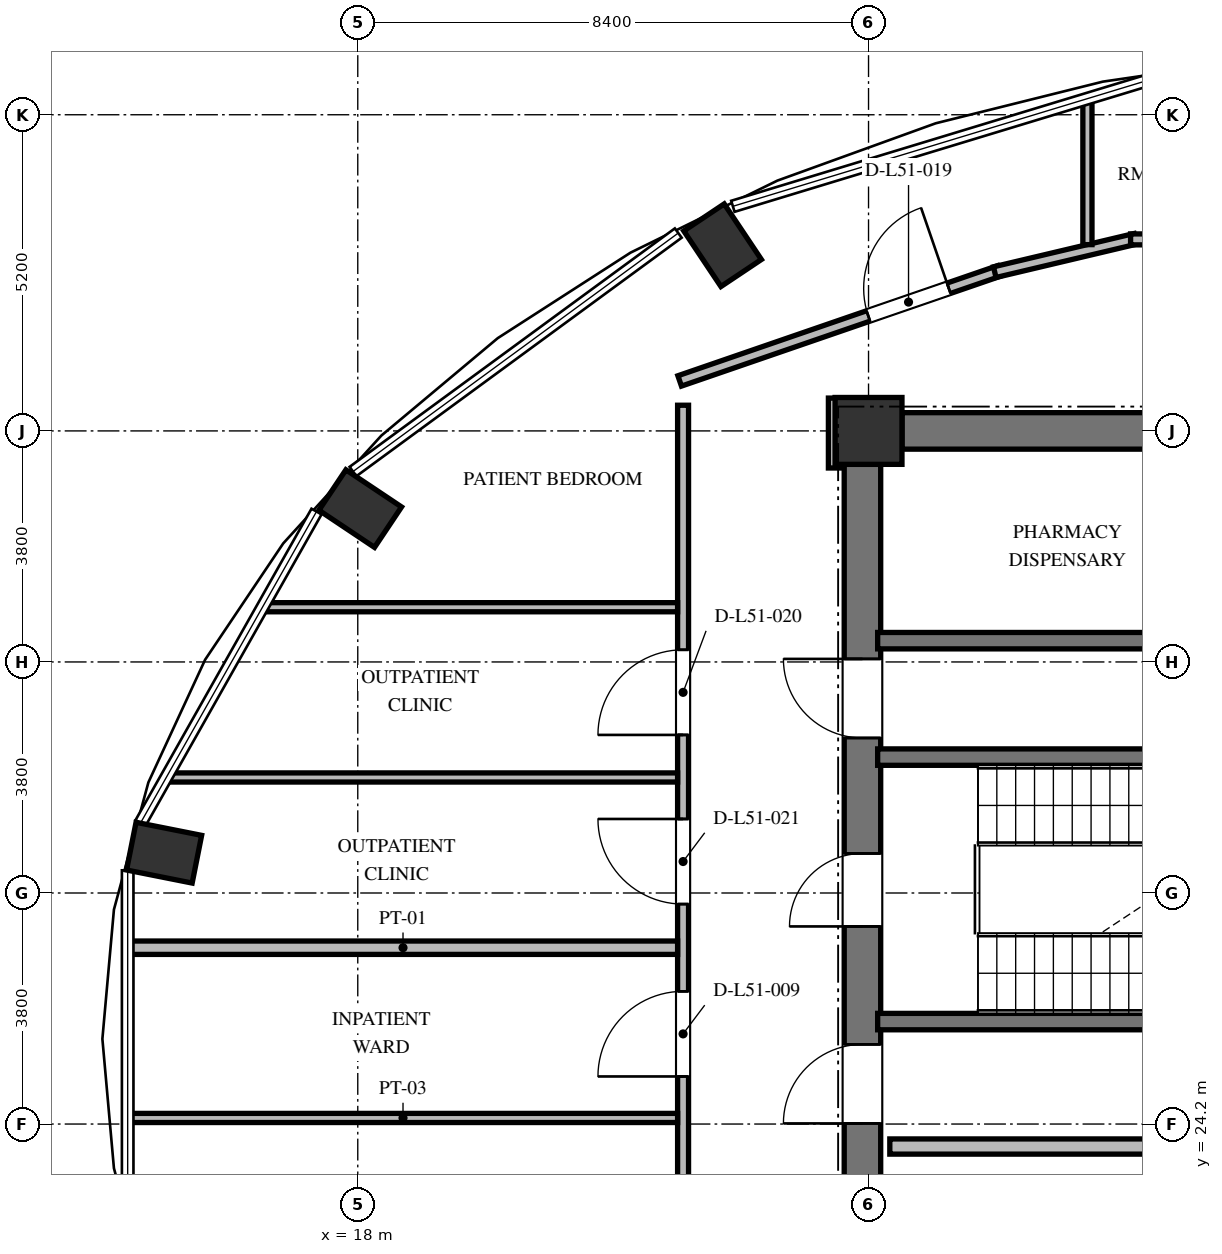
"""IFC4 building model, lengths in metres.
Left out: names, types, materials, properties, quantities, classifications, styles, units other than length and angle.
Written with IfcOpenShell. Run it as: python <this file> out.ifc"""

import sys

from ifc_helpers import new_model, si_unit, direction, frame, frame_2d, origin, origin_2d, place, context, subcontext, project, spatial, rectangle, extrude, element, fill, save


model = new_model("IFC4")
c1 = context("Model", 3, precision=1e-05, world=origin(), true_north=direction((0.0, 1.0)))
c2 = subcontext(c1, "Body", "Model", "MODEL_VIEW")
j1 = project(units=[si_unit("LENGTHUNIT", "METRE"), si_unit("PLANEANGLEUNIT", "RADIAN")], contexts=[c1])
p1 = place(None, origin())
s1 = spatial("IfcSite", under=j1, at=p1, CompositionType="ELEMENT")
p2 = place(p1, origin())
s2 = spatial("IfcBuilding", under=s1, at=p2, CompositionType="ELEMENT")
p3 = place(p2, frame((0.0, 0.0, 198.48)))
s3 = spatial("IfcBuildingStorey", under=s2, at=p3, CompositionType="ELEMENT", Elevation=198.48)
for number, where, z_axis, x_axis in (
    (1, (24.0, 38.654, 0.0), (0.0, 0.0, 1.0), (-0.556, 0.831, 0.0)),
    (2, (18.04, 34.323, 0.0), (0.0, 0.0, 1.0), (-0.831, 0.556, 0.0)),
    (3, (14.815, 28.663, 0.0), (0.0, 0.0, 1.0), (-0.981, 0.195, 0.0)),
):
    element("IfcColumn", number, at=place(p3, frame(where, z_axis=z_axis, x_axis=x_axis)), inside=s3, PredefinedType="COLUMN", context=c2, shape_type="SweptSolid", body=[
        extrude(rectangle(XDim=1.1, YDim=0.8, at=origin_2d()), origin(), (0.0, 0.0, 1.0), 3.648),
    ])
p4 = place(p3, frame((26.4, 35.6, 0.0), z_axis=(0.0, 0.0, 1.0), x_axis=(1.0, 0.0, 0.0)))
e4 = element("IfcColumn", 4, at=p4, inside=s3, PredefinedType="COLUMN", context=c2, shape_type="SweptSolid", body=[
    extrude(rectangle(XDim=1.1, YDim=1.1, at=origin_2d()), origin(), (0.0, 0.0, 1.0), 3.648),
])
p5 = place(p3, frame((26.3, 20.95, 0.0), z_axis=(0.0, 0.0, 1.0), x_axis=(0.0, 1.0, 0.0)))
e5 = element("IfcWall", 5, at=p5, inside=s3, PredefinedType="SHEAR", context=c2, shape_type="SweptSolid", body=[
    extrude(rectangle(XDim=14.1, YDim=0.6, at=frame_2d((7.05, 0.0))), origin(), (0.0, 0.0, 1.0), 3.648),
])
p6 = place(p5, frame((6.5, 0.0, 0.0)))
e6 = element("IfcOpeningElement", 6, at=p6, cuts=e5, PredefinedType="OPENING", context=c2, shape_type="SweptSolid", body=[
    extrude(rectangle(XDim=1.2, YDim=2.15, at=frame_2d((0.6, 1.075))), frame((0.0, 0.31, 0.0), z_axis=(0.0, -1.0, 0.0), x_axis=(1.0, 0.0, 0.0)), (0.0, 0.0, 1.0), 0.62),
])
p7 = place(p5, frame((9.6, 0.0, 0.0)))
e7 = element("IfcOpeningElement", 7, at=p7, cuts=e5, PredefinedType="OPENING", context=c2, shape_type="SweptSolid", body=[
    extrude(rectangle(XDim=1.3, YDim=2.2, at=frame_2d((0.65, 1.1))), frame((0.0, 0.31, 0.0), z_axis=(0.0, -1.0, 0.0), x_axis=(1.0, 0.0, 0.0)), (0.0, 0.0, 1.0), 0.62),
])
p8 = place(p5, frame((3.26, 0.0, 0.0)))
e8 = element("IfcOpeningElement", 8, at=p8, cuts=e5, PredefinedType="OPENING", context=c2, shape_type="SweptSolid", body=[
    extrude(rectangle(XDim=1.3, YDim=2.2, at=frame_2d((0.65, 1.1))), frame((0.0, 0.31, 0.0), z_axis=(0.0, -1.0, 0.0), x_axis=(1.0, 0.0, 0.0)), (0.0, 0.0, 1.0), 0.62),
])
p9 = place(p3, frame((26.95, 35.6, 0.0), z_axis=(0.0, 0.0, 1.0), x_axis=(1.0, 0.0, 0.0)))
e9 = element("IfcWall", 9, at=p9, inside=s3, PredefinedType="SHEAR", context=c2, shape_type="SweptSolid", body=[
    extrude(rectangle(XDim=5.45, YDim=0.6, at=frame_2d((2.725, 0.0))), origin(), (0.0, 0.0, 1.0), 3.648),
])
for number, where, z_axis, x_axis in (
    (10, (26.55, 30.235, 0.0), (0.0, 0.0, 1.0), (1.0, 0.0, 0.0)),
    (11, (26.55, 25.885, 0.0), (0.0, 0.0, 1.0), (1.0, 0.0, 0.0)),
):
    element("IfcWall", number, at=place(p3, frame(where, z_axis=z_axis, x_axis=x_axis)), inside=s3, PredefinedType="SHEAR", context=c2, shape_type="SweptSolid", body=[
        extrude(rectangle(XDim=7.985, YDim=0.27, at=frame_2d((3.992, 0.0))), origin(), (0.0, 0.0, 1.0), 3.648),
    ])
p10 = place(p3, frame((26.55, 32.15, 0.0), z_axis=(0.0, 0.0, 1.0), x_axis=(1.0, 0.0, 0.0)))
e12 = element("IfcWall", 12, at=p10, inside=s3, PredefinedType="SHEAR", context=c2, shape_type="SweptSolid", body=[
    extrude(rectangle(XDim=16.4, YDim=0.27, at=frame_2d((8.2, 0.0))), origin(), (0.0, 0.0, 1.0), 3.648),
])
p11 = place(p10, frame((5.125, 0.0, 0.0)))
e13 = element("IfcOpeningElement", 13, at=p11, cuts=e12, PredefinedType="OPENING", context=c2, shape_type="SweptSolid", body=[
    extrude(rectangle(XDim=1.05, YDim=2.15, at=frame_2d((0.525, 1.075))), frame((0.0, 0.145, 0.0), z_axis=(0.0, -1.0, 0.0), x_axis=(1.0, 0.0, 0.0)), (0.0, 0.0, 1.0), 0.29),
])
p12 = place(p10, frame((11.9, 0.0, 0.0)))
e14 = element("IfcOpeningElement", 14, at=p12, cuts=e12, PredefinedType="OPENING", context=c2, shape_type="SweptSolid", body=[
    extrude(rectangle(XDim=1.1, YDim=2.2, at=frame_2d((0.55, 1.1))), frame((0.0, 0.145, 0.0), z_axis=(0.0, -1.0, 0.0), x_axis=(1.0, 0.0, 0.0)), (0.0, 0.0, 1.0), 0.29),
])
p13 = place(p10, frame((14.5, 0.0, 0.0)))
e15 = element("IfcOpeningElement", 15, at=p13, cuts=e12, PredefinedType="OPENING", context=c2, shape_type="SweptSolid", body=[
    extrude(rectangle(XDim=1.1, YDim=2.2, at=frame_2d((0.55, 1.1))), frame((0.0, 0.145, 0.0), z_axis=(0.0, -1.0, 0.0), x_axis=(1.0, 0.0, 0.0)), (0.0, 0.0, 1.0), 0.29),
])
p14 = place(p3, frame((26.75, 23.83, 0.0), z_axis=(0.0, 0.0, 1.0), x_axis=(1.0, 0.0, 0.0)))
e16 = element("IfcWall", 16, at=p14, inside=s3, PredefinedType="SOLIDWALL", context=c2, shape_type="SweptSolid", body=[
    extrude(rectangle(XDim=16.2, YDim=0.25, at=frame_2d((8.1, 0.0))), origin(), (0.0, 0.0, 1.0), 3.448),
])
p15 = place(p14, frame((4.75, 0.0, 0.0)))
e17 = element("IfcOpeningElement", 17, at=p15, cuts=e16, PredefinedType="OPENING", context=c2, shape_type="SweptSolid", body=[
    extrude(rectangle(XDim=1.4, YDim=2.2, at=frame_2d((0.7, 1.1))), frame((0.0, 0.135, 0.0), z_axis=(0.0, -1.0, 0.0), x_axis=(1.0, 0.0, 0.0)), (0.0, 0.0, 1.0), 0.27),
])
p16 = place(p14, frame((11.7, 0.0, 0.0)))
e18 = element("IfcOpeningElement", 18, at=p16, cuts=e16, PredefinedType="OPENING", context=c2, shape_type="SweptSolid", body=[
    extrude(rectangle(XDim=1.1, YDim=2.2, at=frame_2d((0.55, 1.1))), frame((0.0, 0.135, 0.0), z_axis=(0.0, -1.0, 0.0), x_axis=(1.0, 0.0, 0.0)), (0.0, 0.0, 1.0), 0.27),
])
p17 = place(p14, frame((14.15, 0.0, 0.0)))
e19 = element("IfcOpeningElement", 19, at=p17, cuts=e16, PredefinedType="OPENING", context=c2, shape_type="SweptSolid", body=[
    extrude(rectangle(XDim=1.4, YDim=2.3, at=frame_2d((0.7, 1.15))), frame((0.0, 0.135, 0.0), z_axis=(0.0, -1.0, 0.0), x_axis=(1.0, 0.0, 0.0)), (0.0, 0.0, 1.0), 0.27),
])
p18 = place(p3, frame((23.294, 36.422, 0.0), z_axis=(0.0, 0.0, 1.0), x_axis=(0.945493277461, 0.325641616316, 0.0)))
e20 = element("IfcWall", 20, at=p18, inside=s3, PredefinedType="PARTITIONING", context=c2, shape_type="SweptSolid", body=[
    extrude(rectangle(XDim=5.562, YDim=0.18, at=frame_2d((2.781, 0.0))), origin(), (0.0, 0.0, 1.0), 3.073),
])
p19 = place(p18, frame((3.281, 0.0, 0.0)))
e21 = element("IfcOpeningElement", 21, at=p19, cuts=e20, PredefinedType="OPENING", context=c2, shape_type="SweptSolid", body=[
    extrude(rectangle(XDim=1.4, YDim=2.2, at=frame_2d((0.7, 1.1))), frame((0.0, 0.1, 0.0), z_axis=(0.0, -1.0, 0.0), x_axis=(1.0, 0.0, 0.0)), (0.0, 0.0, 1.0), 0.2),
])
p20 = place(p3, frame((28.476, 38.211, 0.0), z_axis=(0.0, 0.0, 1.0), x_axis=(0.973030562203, 0.230676234189, 0.0)))
e22 = element("IfcWall", 22, at=p20, inside=s3, PredefinedType="PARTITIONING", context=c2, shape_type="SweptSolid", body=[
    extrude(rectangle(XDim=2.377, YDim=0.18, at=frame_2d((1.188, 0.0))), origin(), (0.0, 0.0, 1.0), 3.448),
])
p21 = place(p3, frame((30.71, 38.75, 0.0), z_axis=(0.0, 0.0, 1.0), x_axis=(1.0, 0.0, 0.0)))
e23 = element("IfcWall", 23, at=p21, inside=s3, PredefinedType="PARTITIONING", context=c2, shape_type="SweptSolid", body=[
    extrude(rectangle(XDim=20.815, YDim=0.18, at=frame_2d((10.408, 0.0))), origin(), (0.0, 0.0, 1.0), 3.073),
])
p22 = place(p21, frame((17.194, 0.0, 0.0)))
e24 = element("IfcOpeningElement", 24, at=p22, cuts=e23, PredefinedType="OPENING", context=c2, shape_type="SweptSolid", body=[
    extrude(rectangle(XDim=1.4, YDim=2.2, at=frame_2d((0.7, 1.1))), frame((0.0, 0.1, 0.0), z_axis=(0.0, -1.0, 0.0), x_axis=(1.0, 0.0, 0.0)), (0.0, 0.0, 1.0), 0.2),
])
p23 = place(p21, frame((12.59, 0.0, 0.0)))
e25 = element("IfcOpeningElement", 25, at=p23, cuts=e23, PredefinedType="OPENING", context=c2, shape_type="SweptSolid", body=[
    extrude(rectangle(XDim=1.4, YDim=2.2, at=frame_2d((0.7, 1.1))), frame((0.0, 0.1, 0.0), z_axis=(0.0, -1.0, 0.0), x_axis=(1.0, 0.0, 0.0)), (0.0, 0.0, 1.0), 0.2),
])
p24 = place(p21, frame((8.59, 0.0, 0.0)))
e26 = element("IfcOpeningElement", 26, at=p24, cuts=e23, PredefinedType="OPENING", context=c2, shape_type="SweptSolid", body=[
    extrude(rectangle(XDim=1.4, YDim=2.2, at=frame_2d((0.7, 1.1))), frame((0.0, 0.1, 0.0), z_axis=(0.0, -1.0, 0.0), x_axis=(1.0, 0.0, 0.0)), (0.0, 0.0, 1.0), 0.2),
])
p25 = place(p21, frame((4.59, 0.0, 0.0)))
e27 = element("IfcOpeningElement", 27, at=p25, cuts=e23, PredefinedType="OPENING", context=c2, shape_type="SweptSolid", body=[
    extrude(rectangle(XDim=1.4, YDim=2.2, at=frame_2d((0.7, 1.1))), frame((0.0, 0.1, 0.0), z_axis=(0.0, -1.0, 0.0), x_axis=(1.0, 0.0, 0.0)), (0.0, 0.0, 1.0), 0.2),
])
p26 = place(p21, frame((1.104, 0.0, 0.0)))
e28 = element("IfcOpeningElement", 28, at=p26, cuts=e23, PredefinedType="OPENING", context=c2, shape_type="SweptSolid", body=[
    extrude(rectangle(XDim=1.4, YDim=2.2, at=frame_2d((0.7, 1.1))), frame((0.0, 0.1, 0.0), z_axis=(0.0, -1.0, 0.0), x_axis=(1.0, 0.0, 0.0)), (0.0, 0.0, 1.0), 0.2),
])
p27 = place(p3, frame((25.83, 36.14, 0.0), z_axis=(0.0, 0.0, 1.0), x_axis=(0.0, -1.0, 0.0)))
e29 = element("IfcWall", 29, at=p27, inside=s3, PredefinedType="PARTITIONING", context=c2, shape_type="SweptSolid", body=[
    extrude(rectangle(XDim=1.15, YDim=0.18, at=frame_2d((0.575, 0.0))), origin(), (0.0, 0.0, 1.0), 3.448),
])
p28 = place(p3, frame((23.35, 19.98, 0.0), z_axis=(0.0, 0.0, 1.0), x_axis=(0.0, 1.0, 0.0)))
e30 = element("IfcWall", 30, at=p28, inside=s3, PredefinedType="PARTITIONING", context=c2, shape_type="SweptSolid", body=[
    extrude(rectangle(XDim=16.042, YDim=0.18, at=frame_2d((8.021, 0.0))), origin(), (0.0, 0.0, 1.0), 3.448),
])
p29 = place(p28, frame((5.002, 0.0, 0.0)))
e31 = element("IfcOpeningElement", 31, at=p29, cuts=e30, PredefinedType="OPENING", context=c2, shape_type="SweptSolid", body=[
    extrude(rectangle(XDim=1.4, YDim=2.2, at=frame_2d((0.7, 1.1))), frame((0.0, 0.1, 0.0), z_axis=(0.0, -1.0, 0.0), x_axis=(1.0, 0.0, 0.0)), (0.0, 0.0, 1.0), 0.2),
])
p30 = place(p28, frame((1.794, 0.0, 0.0)))
e32 = element("IfcOpeningElement", 32, at=p30, cuts=e30, PredefinedType="OPENING", context=c2, shape_type="SweptSolid", body=[
    extrude(rectangle(XDim=1.05, YDim=2.15, at=frame_2d((0.525, 1.075))), frame((0.0, 0.1, 0.0), z_axis=(0.0, -1.0, 0.0), x_axis=(1.0, 0.0, 0.0)), (0.0, 0.0, 1.0), 0.2),
])
p31 = place(p28, frame((10.62, 0.0, 0.0)))
e33 = element("IfcOpeningElement", 33, at=p31, cuts=e30, PredefinedType="OPENING", context=c2, shape_type="SweptSolid", body=[
    extrude(rectangle(XDim=1.4, YDim=2.2, at=frame_2d((0.7, 1.1))), frame((0.0, 0.1, 0.0), z_axis=(0.0, -1.0, 0.0), x_axis=(1.0, 0.0, 0.0)), (0.0, 0.0, 1.0), 0.2),
])
p32 = place(p28, frame((7.837, 0.0, 0.0)))
e34 = element("IfcOpeningElement", 34, at=p32, cuts=e30, PredefinedType="OPENING", context=c2, shape_type="SweptSolid", body=[
    extrude(rectangle(XDim=1.4, YDim=2.2, at=frame_2d((0.7, 1.1))), frame((0.0, 0.1, 0.0), z_axis=(0.0, -1.0, 0.0), x_axis=(1.0, 0.0, 0.0)), (0.0, 0.0, 1.0), 0.2),
])
p33 = place(p3, frame((14.228, 24.3, 0.0), z_axis=(0.0, 0.0, 1.0), x_axis=(1.0, 0.0, 0.0)))
e35 = element("IfcWall", 35, at=p33, inside=s3, PredefinedType="PARTITIONING", context=c2, shape_type="SweptSolid", body=[
    extrude(rectangle(XDim=9.032, YDim=0.15, at=frame_2d((4.516, 0.0))), origin(), (0.0, 0.0, 1.0), 3.448),
])
p34 = place(p3, frame((14.228, 27.1, 0.0), z_axis=(0.0, 0.0, 1.0), x_axis=(1.0, 0.0, 0.0)))
e36 = element("IfcWall", 36, at=p34, inside=s3, PredefinedType="PARTITIONING", context=c2, shape_type="SweptSolid", body=[
    extrude(rectangle(XDim=9.032, YDim=0.22, at=frame_2d((4.516, 0.0))), origin(), (0.0, 0.0, 1.0), 3.448),
])
p35 = place(p3, frame((14.861, 29.9, 0.0), z_axis=(0.0, 0.0, 1.0), x_axis=(1.0, 0.0, 0.0)))
e37 = element("IfcWall", 37, at=p35, inside=s3, PredefinedType="PARTITIONING", context=c2, shape_type="SweptSolid", body=[
    extrude(rectangle(XDim=8.399, YDim=0.15, at=frame_2d((4.2, 0.0))), origin(), (0.0, 0.0, 1.0), 3.448),
])
p36 = place(p3, frame((16.443, 32.7, 0.0), z_axis=(0.0, 0.0, 1.0), x_axis=(1.0, 0.0, 0.0)))
e38 = element("IfcWall", 38, at=p36, inside=s3, PredefinedType="PARTITIONING", context=c2, shape_type="SweptSolid", body=[
    extrude(rectangle(XDim=6.817, YDim=0.15, at=frame_2d((3.409, 0.0))), origin(), (0.0, 0.0, 1.0), 3.448),
])
p37 = place(p3, frame((30.0, 38.664, 0.0), z_axis=(0.0, 0.0, 1.0), x_axis=(0.0, 1.0, 0.0)))
e39 = element("IfcWall", 39, at=p37, inside=s3, PredefinedType="PARTITIONING", context=c2, shape_type="SweptSolid", body=[
    extrude(rectangle(XDim=2.384, YDim=0.15, at=frame_2d((1.192, 0.0))), origin(), (0.0, 0.0, 1.0), 3.448),
])
p38 = place(p6, origin())
e40 = element("IfcDoor", 40, at=p38, inside=s3, OperationType="SINGLE_SWING_LEFT", PredefinedType="DOOR", context=c2, shape_type="SweptSolid", body=[
    extrude(rectangle(XDim=1.2, YDim=2.15, at=frame_2d((0.6, 1.075))), frame((0.0, 0.025, 0.0), z_axis=(0.0, -1.0, 0.0), x_axis=(1.0, 0.0, 0.0)), (0.0, 0.0, 1.0), 0.05),
])
fill(e6, e40)
p39 = place(p7, origin())
e41 = element("IfcDoor", 41, at=p39, inside=s3, OperationType="SINGLE_SWING_RIGHT", PredefinedType="DOOR", context=c2, shape_type="SweptSolid", body=[
    extrude(rectangle(XDim=1.3, YDim=2.2, at=frame_2d((0.65, 1.1))), frame((0.0, 0.025, 0.0), z_axis=(0.0, -1.0, 0.0), x_axis=(1.0, 0.0, 0.0)), (0.0, 0.0, 1.0), 0.05),
])
fill(e7, e41)
p40 = place(p8, origin())
e42 = element("IfcDoor", 42, at=p40, inside=s3, OperationType="SINGLE_SWING_LEFT", PredefinedType="DOOR", context=c2, shape_type="SweptSolid", body=[
    extrude(rectangle(XDim=1.3, YDim=2.2, at=frame_2d((0.65, 1.1))), frame((0.0, 0.025, 0.0), z_axis=(0.0, -1.0, 0.0), x_axis=(1.0, 0.0, 0.0)), (0.0, 0.0, 1.0), 0.05),
])
fill(e8, e42)
p41 = place(p29, origin())
e43 = element("IfcDoor", 43, at=p41, inside=s3, OperationType="SINGLE_SWING_LEFT", PredefinedType="DOOR", context=c2, shape_type="SweptSolid", body=[
    extrude(rectangle(XDim=1.4, YDim=2.2, at=frame_2d((0.7, 1.1))), frame((0.0, 0.025, 0.0), z_axis=(0.0, -1.0, 0.0), x_axis=(1.0, 0.0, 0.0)), (0.0, 0.0, 1.0), 0.05),
])
fill(e31, e43)
p42 = place(p19, origin())
e44 = element("IfcDoor", 44, at=p42, inside=s3, OperationType="SINGLE_SWING_RIGHT", PredefinedType="DOOR", context=c2, shape_type="SweptSolid", body=[
    extrude(rectangle(XDim=1.4, YDim=2.2, at=frame_2d((0.7, 1.1))), frame((0.0, 0.025, 0.0), z_axis=(0.0, -1.0, 0.0), x_axis=(1.0, 0.0, 0.0)), (0.0, 0.0, 1.0), 0.05),
])
fill(e21, e44)
p43 = place(p31, origin())
e45 = element("IfcDoor", 45, at=p43, inside=s3, OperationType="SINGLE_SWING_LEFT", PredefinedType="DOOR", context=c2, shape_type="SweptSolid", body=[
    extrude(rectangle(XDim=1.4, YDim=2.2, at=frame_2d((0.7, 1.1))), frame((0.0, 0.025, 0.0), z_axis=(0.0, -1.0, 0.0), x_axis=(1.0, 0.0, 0.0)), (0.0, 0.0, 1.0), 0.05),
])
fill(e33, e45)
p44 = place(p32, origin())
e46 = element("IfcDoor", 46, at=p44, inside=s3, OperationType="SINGLE_SWING_RIGHT", PredefinedType="DOOR", context=c2, shape_type="SweptSolid", body=[
    extrude(rectangle(XDim=1.4, YDim=2.2, at=frame_2d((0.7, 1.1))), frame((0.0, 0.025, 0.0), z_axis=(0.0, -1.0, 0.0), x_axis=(1.0, 0.0, 0.0)), (0.0, 0.0, 1.0), 0.05),
])
fill(e34, e46)
save(model, sys.argv[1])
